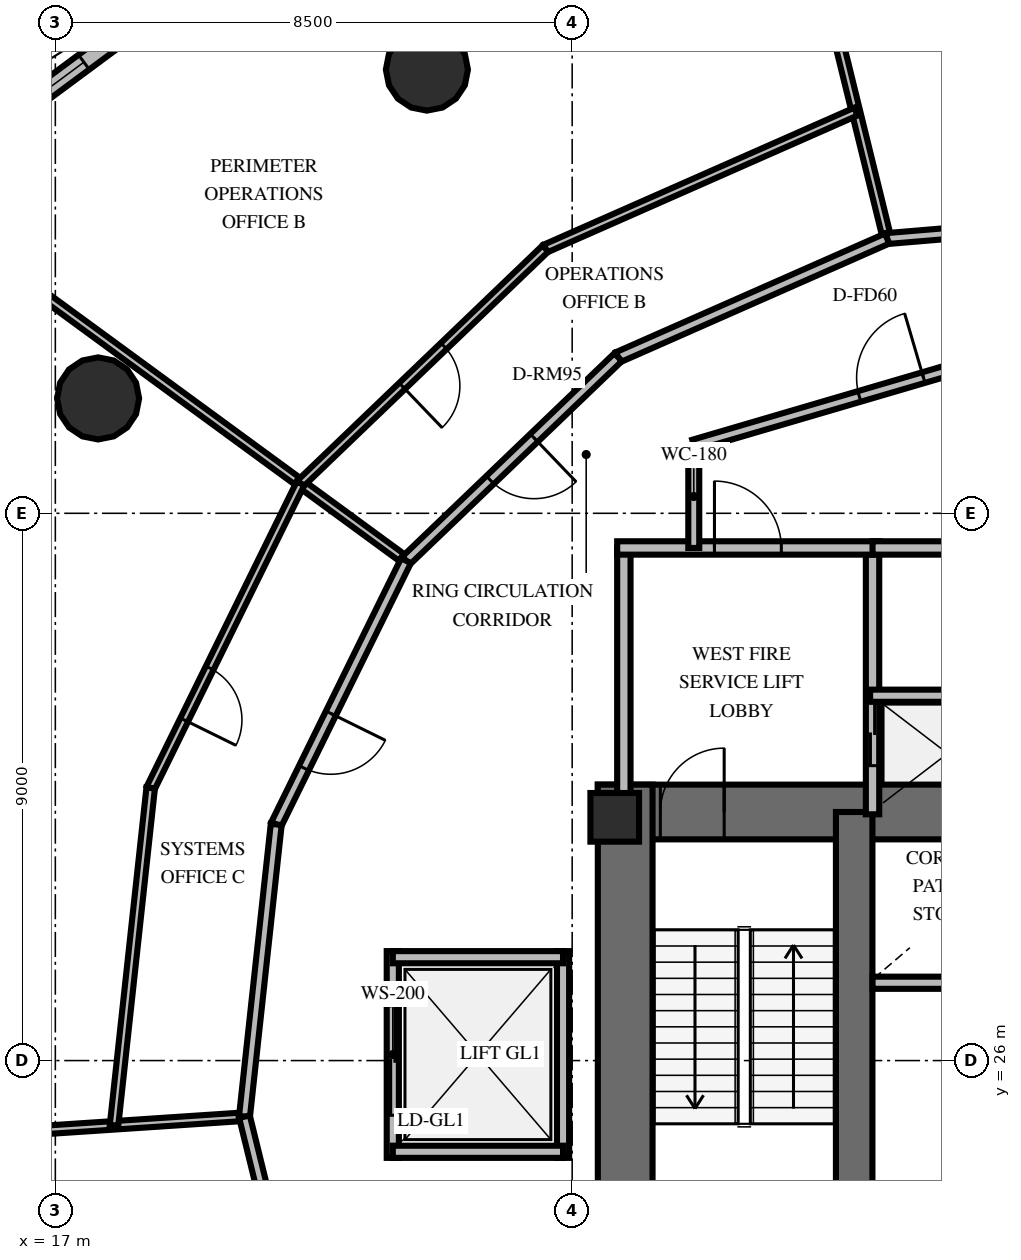
"""IFC4 building model, lengths in metres.
Left out: names, types, materials, properties, quantities, classifications, styles, units other than length and angle.
Written with IfcOpenShell. Run it as: python <this file> out.ifc"""

import sys

from ifc_helpers import new_model, si_unit, direction, frame, frame_2d, origin, origin_2d, place, context, subcontext, project, spatial, rectangle, circle, extrude, element, fill, save


model = new_model("IFC4")
c1 = context("Model", 3, precision=1e-05, world=origin(), true_north=direction((0.0, 1.0)))
c2 = subcontext(c1, "Body", "Model", "MODEL_VIEW")
j1 = project(units=[si_unit("LENGTHUNIT", "METRE"), si_unit("PLANEANGLEUNIT", "RADIAN")], contexts=[c1])
p1 = place(None, origin())
s1 = spatial("IfcSite", under=j1, at=p1, CompositionType="ELEMENT")
p2 = place(p1, origin())
s2 = spatial("IfcBuilding", under=s1, at=p2, CompositionType="ELEMENT")
p3 = place(p2, frame((0.0, 0.0, 46.8)))
s3 = spatial("IfcBuildingStorey", under=s2, at=p3, CompositionType="ELEMENT", Elevation=46.8)
p4 = place(p3, frame((25.922, 30.088, 0.0), z_axis=(0.0, 0.0, 1.0), x_axis=(1.0, 0.0, 0.0)))
e1 = element("IfcWall", 1, at=p4, inside=s3, PredefinedType="SHEAR", context=c2, shape_type="SweptSolid", body=[
    extrude(rectangle(XDim=16.166, YDim=0.9, at=frame_2d((8.083, 0.0))), origin(), (0.0, 0.0, 1.0), 4.2),
])
p5 = place(p4, frame((1.028, 0.0, 0.0)))
e2 = element("IfcOpeningElement", 2, at=p5, cuts=e1, PredefinedType="OPENING", context=c2, shape_type="SweptSolid", body=[
    extrude(rectangle(XDim=1.05, YDim=2.15, at=frame_2d((0.525, 1.075))), frame((0.0, 0.46, 0.0), z_axis=(0.0, -1.0, 0.0), x_axis=(1.0, 0.0, 0.0)), (0.0, 0.0, 1.0), 0.92),
])
p6 = place(p4, frame((14.078, 0.0, 0.0)))
e3 = element("IfcOpeningElement", 3, at=p6, cuts=e1, PredefinedType="OPENING", context=c2, shape_type="SweptSolid", body=[
    extrude(rectangle(XDim=1.05, YDim=2.15, at=frame_2d((0.525, 1.075))), frame((0.0, 0.46, 0.0), z_axis=(0.0, -1.0, 0.0), x_axis=(1.0, 0.0, 0.0)), (0.0, 0.0, 1.0), 0.92),
])
p7 = place(p4, frame((7.528, 0.0, 0.0)))
e4 = element("IfcOpeningElement", 4, at=p7, cuts=e1, PredefinedType="OPENING", context=c2, shape_type="SweptSolid", body=[
    extrude(rectangle(XDim=1.1, YDim=2.15, at=frame_2d((0.55, 1.075))), frame((0.0, 0.46, 0.0), z_axis=(0.0, -1.0, 0.0), x_axis=(1.0, 0.0, 0.0)), (0.0, 0.0, 1.0), 0.92),
])
p8 = place(p3, frame((26.372, 19.662, 0.0), z_axis=(0.0, 0.0, 1.0), x_axis=(0.0, 1.0, 0.0)))
e5 = element("IfcWall", 5, at=p8, inside=s3, PredefinedType="SHEAR", context=c2, shape_type="SweptSolid", body=[
    extrude(rectangle(XDim=10.876, YDim=0.9, at=frame_2d((5.438, 0.0))), origin(), (0.0, 0.0, 1.0), 4.2),
])
p9 = place(p3, frame((30.138, 20.112, 0.0), z_axis=(0.0, 0.0, 1.0), x_axis=(0.0, 1.0, 0.0)))
e6 = element("IfcWall", 6, at=p9, inside=s3, PredefinedType="SHEAR", context=c2, shape_type="SweptSolid", body=[
    extrude(rectangle(XDim=9.976, YDim=0.6, at=frame_2d((4.988, 0.0))), origin(), (0.0, 0.0, 1.0), 4.2),
])
p10 = place(p3, frame((26.2, 30.0, 0.0), z_axis=(0.0, 0.0, 1.0), x_axis=(1.0, 0.0, 0.0)))
e7 = element("IfcColumn", 7, at=p10, inside=s3, PredefinedType="PILASTER", context=c2, shape_type="SweptSolid", body=[
    extrude(rectangle(XDim=0.8, YDim=0.8, at=origin_2d()), origin(), (0.0, 0.0, 1.0), 4.2),
])
for number, where, z_axis, x_axis in (
    (8, (23.111, 42.297, 0.0), (0.0, 0.0, 1.0), (1.0, 0.0, 0.0)),
    (9, (17.703, 36.889, 0.0), (0.0, 0.0, 1.0), (1.0, 0.0, 0.0)),
):
    element("IfcColumn", number, at=place(p3, frame(where, z_axis=z_axis, x_axis=x_axis)), inside=s3, PredefinedType="COLUMN", context=c2, shape_type="SweptSolid", body=[
        extrude(circle(Radius=0.675, at=origin_2d()), origin(), (0.0, 0.0, 1.0), 4.2),
    ])
p11 = place(p3, frame((18.908, 43.485, 0.0), z_axis=(0.0, 0.0, 1.0), x_axis=(-0.803465201032, -0.595351720187, 0.0)))
e10 = element("IfcWall", 10, at=p11, inside=s3, PredefinedType="SOLIDWALL", context=c2, shape_type="SweptSolid", body=[
    extrude(rectangle(XDim=8.792, YDim=0.3, at=frame_2d((4.396, 0.0))), origin(), (0.0, 0.0, 1.0), 3.0),
])
p12 = place(p11, frame((1.79, 0.0, 0.8)))
e11 = element("IfcOpeningElement", 11, at=p12, cuts=e10, PredefinedType="OPENING", context=c2, shape_type="SweptSolid", body=[
    extrude(rectangle(XDim=1.8, YDim=1.95, at=frame_2d((0.9, 0.975))), frame((0.0, 0.16, 0.0), z_axis=(0.0, -1.0, 0.0), x_axis=(1.0, 0.0, 0.0)), (0.0, 0.0, 1.0), 0.32),
])
p13 = place(p3, frame((26.35, 30.05, 0.0), z_axis=(0.0, 0.0, 1.0), x_axis=(0.0, 1.0, 0.0)))
e12 = element("IfcWall", 12, at=p13, inside=s3, PredefinedType="SOLIDWALL", context=c2, shape_type="SweptSolid", body=[
    extrude(rectangle(XDim=4.38, YDim=0.22, at=frame_2d((2.19, 0.0))), origin(), (0.0, 0.0, 1.0), 3.0),
])
p14 = place(p3, frame((30.44, 30.05, 0.0), z_axis=(0.0, 0.0, 1.0), x_axis=(0.0, 1.0, 0.0)))
e13 = element("IfcWall", 13, at=p14, inside=s3, PredefinedType="SOLIDWALL", context=c2, shape_type="SweptSolid", body=[
    extrude(rectangle(XDim=4.38, YDim=0.22, at=frame_2d((2.19, 0.0))), origin(), (0.0, 0.0, 1.0), 3.0),
])
p15 = place(p14, frame((0.8, 0.0, 0.0)))
e14 = element("IfcOpeningElement", 14, at=p15, cuts=e13, PredefinedType="OPENING", context=c2, shape_type="SweptSolid", body=[
    extrude(rectangle(XDim=1.05, YDim=2.1, at=frame_2d((0.525, 1.05))), frame((0.0, 0.12, 0.0), z_axis=(0.0, -1.0, 0.0), x_axis=(1.0, 0.0, 0.0)), (0.0, 0.0, 1.0), 0.24),
])
p16 = place(p3, frame((26.24, 34.43, 0.0), z_axis=(0.0, 0.0, 1.0), x_axis=(1.0, 0.0, 0.0)))
e15 = element("IfcWall", 15, at=p16, inside=s3, PredefinedType="SOLIDWALL", context=c2, shape_type="SweptSolid", body=[
    extrude(rectangle(XDim=4.31, YDim=0.22, at=frame_2d((2.155, 0.0))), origin(), (0.0, 0.0, 1.0), 3.0),
])
p17 = place(p16, frame((1.6, 0.0, 0.0)))
e16 = element("IfcOpeningElement", 16, at=p17, cuts=e15, PredefinedType="OPENING", context=c2, shape_type="SweptSolid", body=[
    extrude(rectangle(XDim=1.1, YDim=2.15, at=frame_2d((0.55, 1.075))), frame((0.0, 0.12, 0.0), z_axis=(0.0, -1.0, 0.0), x_axis=(1.0, 0.0, 0.0)), (0.0, 0.0, 1.0), 0.24),
])
p18 = place(p3, frame((30.4, 32.0, 0.0), z_axis=(0.0, 0.0, 1.0), x_axis=(1.0, 0.0, 0.0)))
e17 = element("IfcWall", 17, at=p18, inside=s3, PredefinedType="SOLIDWALL", context=c2, shape_type="SweptSolid", body=[
    extrude(rectangle(XDim=2.55, YDim=0.2, at=frame_2d((1.275, 0.0))), origin(), (0.0, 0.0, 1.0), 3.0),
])
p19 = place(p3, frame((30.44, 34.43, 0.0), z_axis=(0.0, 0.0, 1.0), x_axis=(1.0, 0.0, 0.0)))
e18 = element("IfcWall", 18, at=p19, inside=s3, PredefinedType="SOLIDWALL", context=c2, shape_type="SweptSolid", body=[
    extrude(rectangle(XDim=7.12, YDim=0.22, at=frame_2d((3.56, 0.0))), origin(), (0.0, 0.0, 1.0), 3.0),
])
p20 = place(p19, frame((3.01, 0.0, 0.0)))
e19 = element("IfcOpeningElement", 19, at=p20, cuts=e18, PredefinedType="OPENING", context=c2, shape_type="SweptSolid", body=[
    extrude(rectangle(XDim=1.1, YDim=2.15, at=frame_2d((0.55, 1.075))), frame((0.0, 0.12, 0.0), z_axis=(0.0, -1.0, 0.0), x_axis=(1.0, 0.0, 0.0)), (0.0, 0.0, 1.0), 0.24),
])
p21 = place(p3, frame((30.44, 27.28, 0.0), z_axis=(0.0, 0.0, 1.0), x_axis=(1.0, 0.0, 0.0)))
e20 = element("IfcWall", 20, at=p21, inside=s3, PredefinedType="SOLIDWALL", context=c2, shape_type="SweptSolid", body=[
    extrude(rectangle(XDim=2.81, YDim=0.2, at=frame_2d((1.405, 0.0))), origin(), (0.0, 0.0, 1.0), 3.0),
])
p22 = place(p3, frame((22.55, 24.4, 0.0), z_axis=(0.0, 0.0, 1.0), x_axis=(0.0, 1.0, 0.0)))
e21 = element("IfcWall", 21, at=p22, inside=s3, PredefinedType="SOLIDWALL", context=c2, shape_type="SweptSolid", body=[
    extrude(rectangle(XDim=3.4, YDim=0.2, at=frame_2d((1.7, 0.0))), origin(), (0.0, 0.0, 1.0), 3.0),
])
p23 = place(p22, frame((0.7, 0.0, 0.0)))
e22 = element("IfcOpeningElement", 22, at=p23, cuts=e21, PredefinedType="OPENING", context=c2, shape_type="SweptSolid", body=[
    extrude(rectangle(XDim=1.8, YDim=2.4, at=frame_2d((0.9, 1.2))), frame((0.0, 0.11, 0.0), z_axis=(0.0, -1.0, 0.0), x_axis=(1.0, 0.0, 0.0)), (0.0, 0.0, 1.0), 0.22),
])
p24 = place(p3, frame((25.35, 24.4, 0.0), z_axis=(0.0, 0.0, 1.0), x_axis=(0.0, 1.0, 0.0)))
e23 = element("IfcWall", 23, at=p24, inside=s3, PredefinedType="SOLIDWALL", context=c2, shape_type="SweptSolid", body=[
    extrude(rectangle(XDim=3.4, YDim=0.2, at=frame_2d((1.7, 0.0))), origin(), (0.0, 0.0, 1.0), 3.0),
])
for number, where, z_axis, x_axis in (
    (24, (22.55, 24.5, 0.0), (0.0, 0.0, 1.0), (1.0, 0.0, 0.0)),
    (25, (22.55, 27.7, 0.0), (0.0, 0.0, 1.0), (1.0, 0.0, 0.0)),
):
    element("IfcWall", number, at=place(p3, frame(where, z_axis=z_axis, x_axis=x_axis)), inside=s3, PredefinedType="SOLIDWALL", context=c2, shape_type="SweptSolid", body=[
        extrude(rectangle(XDim=2.8, YDim=0.2, at=frame_2d((1.4, 0.0))), origin(), (0.0, 0.0, 1.0), 3.0),
    ])
p25 = place(p3, frame((27.5, 34.43, 0.0), z_axis=(0.0, 0.0, 1.0), x_axis=(0.0, 1.0, 0.0)))
e26 = element("IfcWall", 26, at=p25, inside=s3, PredefinedType="PARTITIONING", context=c2, shape_type="SweptSolid", body=[
    extrude(rectangle(XDim=1.693, YDim=0.18, at=frame_2d((0.846, 0.0))), origin(), (0.0, 0.0, 1.0), 3.0),
])
p26 = place(p3, frame((27.5, 36.123, 0.0), z_axis=(0.0, 0.0, 1.0), x_axis=(0.959546654541, 0.281549671923, 0.0)))
e27 = element("IfcWall", 27, at=p26, inside=s3, PredefinedType="PARTITIONING", context=c2, shape_type="SweptSolid", body=[
    extrude(rectangle(XDim=6.774, YDim=0.18, at=frame_2d((3.387, 0.0))), origin(), (0.0, 0.0, 1.0), 3.0),
])
p27 = place(p26, frame((2.837, 0.0, 0.0)))
e28 = element("IfcOpeningElement", 28, at=p27, cuts=e27, PredefinedType="OPENING", context=c2, shape_type="SweptSolid", body=[
    extrude(rectangle(XDim=1.1, YDim=2.15, at=frame_2d((0.55, 1.075))), frame((0.0, 0.1, 0.0), z_axis=(0.0, -1.0, 0.0), x_axis=(1.0, 0.0, 0.0)), (0.0, 0.0, 1.0), 0.2),
])
p28 = place(p3, frame((30.68, 39.518, 0.0), z_axis=(0.0, 0.0, 1.0), x_axis=(-0.238558066821, 0.971128234969, 0.0)))
e29 = element("IfcWall", 29, at=p28, inside=s3, PredefinedType="PARTITIONING", context=c2, shape_type="SweptSolid", body=[
    extrude(rectangle(XDim=7.514, YDim=0.14, at=frame_2d((3.757, 0.0))), origin(), (0.0, 0.0, 1.0), 3.0),
])
p29 = place(p3, frame((35.02, 39.883, 0.0), z_axis=(0.0, 0.0, 1.0), x_axis=(-0.99649609518, -0.083639298718, 0.0)))
e30 = element("IfcWall", 30, at=p29, inside=s3, PredefinedType="PARTITIONING", context=c2, shape_type="SweptSolid", body=[
    extrude(rectangle(XDim=4.355, YDim=0.18, at=frame_2d((2.178, 0.0))), origin(), (0.0, 0.0, 1.0), 3.0),
])
p30 = place(p29, frame((0.914, 0.0, 0.0)))
e31 = element("IfcOpeningElement", 31, at=p30, cuts=e30, PredefinedType="OPENING", context=c2, shape_type="SweptSolid", body=[
    extrude(rectangle(XDim=1.0, YDim=2.15, at=frame_2d((0.5, 1.075))), frame((0.0, 0.1, 0.0), z_axis=(0.0, -1.0, 0.0), x_axis=(1.0, 0.0, 0.0)), (0.0, 0.0, 1.0), 0.2),
])
p31 = place(p3, frame((22.767, 34.221, 0.0), z_axis=(0.0, 0.0, 1.0), x_axis=(-0.806954200192, 0.590614018453, 0.0)))
e32 = element("IfcWall", 32, at=p31, inside=s3, PredefinedType="PARTITIONING", context=c2, shape_type="SweptSolid", body=[
    extrude(rectangle(XDim=10.55, YDim=0.14, at=frame_2d((5.275, 0.0))), origin(), (0.0, 0.0, 1.0), 3.0),
])
p32 = place(p3, frame((30.68, 39.518, 0.0), z_axis=(0.0, 0.0, 1.0), x_axis=(-0.914959483899, -0.403545713425, 0.0)))
e33 = element("IfcWall", 33, at=p32, inside=s3, PredefinedType="PARTITIONING", context=c2, shape_type="SweptSolid", body=[
    extrude(rectangle(XDim=4.834, YDim=0.18, at=frame_2d((2.417, 0.0))), origin(), (0.0, 0.0, 1.0), 3.0),
])
p33 = place(p3, frame((26.256, 37.567, 0.0), z_axis=(0.0, 0.0, 1.0), x_axis=(-0.721748503055, -0.692155400425, 0.0)))
e34 = element("IfcWall", 34, at=p33, inside=s3, PredefinedType="PARTITIONING", context=c2, shape_type="SweptSolid", body=[
    extrude(rectangle(XDim=4.834, YDim=0.18, at=frame_2d((2.417, 0.0))), origin(), (0.0, 0.0, 1.0), 3.0),
])
p34 = place(p33, frame((1.917, 0.0, 0.0)))
e35 = element("IfcOpeningElement", 35, at=p34, cuts=e34, PredefinedType="OPENING", context=c2, shape_type="SweptSolid", body=[
    extrude(rectangle(XDim=1.0, YDim=2.15, at=frame_2d((0.5, 1.075))), frame((0.0, 0.1, 0.0), z_axis=(0.0, -1.0, 0.0), x_axis=(1.0, 0.0, 0.0)), (0.0, 0.0, 1.0), 0.2),
])
p35 = place(p3, frame((30.167, 41.606, 0.0), z_axis=(0.0, 0.0, 1.0), x_axis=(-0.914960559012, -0.403543275812, 0.0)))
e36 = element("IfcWall", 36, at=p35, inside=s3, PredefinedType="PARTITIONING", context=c2, shape_type="SweptSolid", body=[
    extrude(rectangle(XDim=5.581, YDim=0.14, at=frame_2d((2.791, 0.0))), origin(), (0.0, 0.0, 1.0), 3.0),
])
p36 = place(p3, frame((25.06, 39.354, 0.0), z_axis=(0.0, 0.0, 1.0), x_axis=(-0.721758722744, -0.692144743636, 0.0)))
e37 = element("IfcWall", 37, at=p36, inside=s3, PredefinedType="PARTITIONING", context=c2, shape_type="SweptSolid", body=[
    extrude(rectangle(XDim=5.581, YDim=0.14, at=frame_2d((2.791, 0.0))), origin(), (0.0, 0.0, 1.0), 3.0),
])
p37 = place(p36, frame((2.315, 0.0, 0.0)))
e38 = element("IfcOpeningElement", 38, at=p37, cuts=e37, PredefinedType="OPENING", context=c2, shape_type="SweptSolid", body=[
    extrude(rectangle(XDim=0.95, YDim=2.15, at=frame_2d((0.475, 1.075))), frame((0.0, 0.08, 0.0), z_axis=(0.0, -1.0, 0.0), x_axis=(1.0, 0.0, 0.0)), (0.0, 0.0, 1.0), 0.16),
])
p38 = place(p3, frame((20.111, 25.077, 0.0), z_axis=(0.0, 0.0, 1.0), x_axis=(-0.99780247965, -0.066258671923, 0.0)))
e39 = element("IfcWall", 39, at=p38, inside=s3, PredefinedType="PARTITIONING", context=c2, shape_type="SweptSolid", body=[
    extrude(rectangle(XDim=13.88, YDim=0.14, at=frame_2d((6.94, 0.0))), origin(), (0.0, 0.0, 1.0), 3.0),
])
p39 = place(p3, frame((22.767, 34.221, 0.0), z_axis=(0.0, 0.0, 1.0), x_axis=(-0.44148764498, -0.897267328799, 0.0)))
e40 = element("IfcWall", 40, at=p39, inside=s3, PredefinedType="PARTITIONING", context=c2, shape_type="SweptSolid", body=[
    extrude(rectangle(XDim=4.834, YDim=0.18, at=frame_2d((2.417, 0.0))), origin(), (0.0, 0.0, 1.0), 3.0),
])
p40 = place(p39, frame((2.801, 0.0, 0.0)))
e41 = element("IfcOpeningElement", 41, at=p40, cuts=e40, PredefinedType="OPENING", context=c2, shape_type="SweptSolid", body=[
    extrude(rectangle(XDim=1.0, YDim=2.15, at=frame_2d((0.5, 1.075))), frame((0.0, 0.1, 0.0), z_axis=(0.0, -1.0, 0.0), x_axis=(1.0, 0.0, 0.0)), (0.0, 0.0, 1.0), 0.2),
])
p41 = place(p3, frame((20.633, 29.884, 0.0), z_axis=(0.0, 0.0, 1.0), x_axis=(-0.108020120209, -0.994148708006, 0.0)))
e42 = element("IfcWall", 42, at=p41, inside=s3, PredefinedType="PARTITIONING", context=c2, shape_type="SweptSolid", body=[
    extrude(rectangle(XDim=4.834, YDim=0.18, at=frame_2d((2.417, 0.0))), origin(), (0.0, 0.0, 1.0), 3.0),
])
p42 = place(p3, frame((21.032, 35.491, 0.0), z_axis=(0.0, 0.0, 1.0), x_axis=(-0.441482494999, -0.897269862756, 0.0)))
e43 = element("IfcWall", 43, at=p42, inside=s3, PredefinedType="PARTITIONING", context=c2, shape_type="SweptSolid", body=[
    extrude(rectangle(XDim=5.581, YDim=0.14, at=frame_2d((2.791, 0.0))), origin(), (0.0, 0.0, 1.0), 3.0),
])
p43 = place(p42, frame((3.383, 0.0, 0.0)))
e44 = element("IfcOpeningElement", 44, at=p43, cuts=e43, PredefinedType="OPENING", context=c2, shape_type="SweptSolid", body=[
    extrude(rectangle(XDim=0.95, YDim=2.15, at=frame_2d((0.475, 1.075))), frame((0.0, 0.08, 0.0), z_axis=(0.0, -1.0, 0.0), x_axis=(1.0, 0.0, 0.0)), (0.0, 0.0, 1.0), 0.16),
])
p44 = place(p3, frame((18.568, 30.483, 0.0), z_axis=(0.0, 0.0, 1.0), x_axis=(-0.10800654761, -0.994150182655, 0.0)))
e45 = element("IfcWall", 45, at=p44, inside=s3, PredefinedType="PARTITIONING", context=c2, shape_type="SweptSolid", body=[
    extrude(rectangle(XDim=5.581, YDim=0.14, at=frame_2d((2.791, 0.0))), origin(), (0.0, 0.0, 1.0), 3.0),
])
p45 = place(p3, frame((20.111, 25.077, 0.0), z_axis=(0.0, 0.0, 1.0), x_axis=(0.23856484239, -0.971126570523, 0.0)))
e46 = element("IfcWall", 46, at=p45, inside=s3, PredefinedType="PARTITIONING", context=c2, shape_type="SweptSolid", body=[
    extrude(rectangle(XDim=4.834, YDim=0.18, at=frame_2d((2.417, 0.0))), origin(), (0.0, 0.0, 1.0), 3.0),
])
p46 = place(p45, frame((2.801, 0.0, 0.0)))
e47 = element("IfcOpeningElement", 47, at=p46, cuts=e46, PredefinedType="OPENING", context=c2, shape_type="SweptSolid", body=[
    extrude(rectangle(XDim=1.0, YDim=2.15, at=frame_2d((0.5, 1.075))), frame((0.0, 0.1, 0.0), z_axis=(0.0, -1.0, 0.0), x_axis=(1.0, 0.0, 0.0)), (0.0, 0.0, 1.0), 0.2),
])
p47 = place(p12, origin())
e48 = element("IfcWindow", 48, at=p47, inside=s3, PartitioningType="SINGLE_PANEL", PredefinedType="WINDOW", context=c2, shape_type="SweptSolid", body=[
    extrude(rectangle(XDim=1.8, YDim=1.95, at=frame_2d((0.9, 0.975))), frame((0.0, 0.03, 0.0), z_axis=(0.0, -1.0, 0.0), x_axis=(1.0, 0.0, 0.0)), (0.0, 0.0, 1.0), 0.06),
])
fill(e11, e48)
p48 = place(p5, origin())
e49 = element("IfcDoor", 49, at=p48, inside=s3, OperationType="SINGLE_SWING_RIGHT", PredefinedType="DOOR", context=c2, shape_type="SweptSolid", body=[
    extrude(rectangle(XDim=1.05, YDim=2.15, at=frame_2d((0.525, 1.075))), frame((0.0, 0.025, 0.0), z_axis=(0.0, -1.0, 0.0), x_axis=(1.0, 0.0, 0.0)), (0.0, 0.0, 1.0), 0.05),
])
fill(e2, e49)
p49 = place(p17, origin())
e50 = element("IfcDoor", 50, at=p49, inside=s3, OperationType="SINGLE_SWING_LEFT", PredefinedType="DOOR", context=c2, shape_type="SweptSolid", body=[
    extrude(rectangle(XDim=1.1, YDim=2.15, at=frame_2d((0.55, 1.075))), frame((0.0, 0.025, 0.0), z_axis=(0.0, -1.0, 0.0), x_axis=(1.0, 0.0, 0.0)), (0.0, 0.0, 1.0), 0.05),
])
fill(e16, e50)
p50 = place(p15, origin())
e51 = element("IfcDoor", 51, at=p50, inside=s3, OperationType="DOUBLE_DOOR_SLIDING", PredefinedType="USERDEFINED", context=c2, shape_type="SweptSolid", body=[
    extrude(rectangle(XDim=1.05, YDim=2.1, at=frame_2d((0.525, 1.05))), frame((0.0, 0.025, 0.0), z_axis=(0.0, -1.0, 0.0), x_axis=(1.0, 0.0, 0.0)), (0.0, 0.0, 1.0), 0.05),
])
fill(e14, e51)
p51 = place(p23, origin())
e52 = element("IfcDoor", 52, at=p51, inside=s3, OperationType="DOUBLE_DOOR_SLIDING", PredefinedType="USERDEFINED", context=c2, shape_type="SweptSolid", body=[
    extrude(rectangle(XDim=1.8, YDim=2.4, at=frame_2d((0.9, 1.2))), frame((0.0, 0.025, 0.0), z_axis=(0.0, -1.0, 0.0), x_axis=(1.0, 0.0, 0.0)), (0.0, 0.0, 1.0), 0.05),
])
fill(e22, e52)
p52 = place(p27, origin())
e53 = element("IfcDoor", 53, at=p52, inside=s3, OperationType="SINGLE_SWING_RIGHT", PredefinedType="DOOR", context=c2, shape_type="SweptSolid", body=[
    extrude(rectangle(XDim=1.1, YDim=2.15, at=frame_2d((0.55, 1.075))), frame((0.0, 0.025, 0.0), z_axis=(0.0, -1.0, 0.0), x_axis=(1.0, 0.0, 0.0)), (0.0, 0.0, 1.0), 0.05),
])
fill(e28, e53)
p53 = place(p34, origin())
e54 = element("IfcDoor", 54, at=p53, inside=s3, OperationType="SINGLE_SWING_LEFT", PredefinedType="DOOR", context=c2, shape_type="SweptSolid", body=[
    extrude(rectangle(XDim=1.0, YDim=2.15, at=frame_2d((0.5, 1.075))), frame((0.0, 0.025, 0.0), z_axis=(0.0, -1.0, 0.0), x_axis=(1.0, 0.0, 0.0)), (0.0, 0.0, 1.0), 0.05),
])
fill(e35, e54)
p54 = place(p37, origin())
e55 = element("IfcDoor", 55, at=p54, inside=s3, OperationType="SINGLE_SWING_RIGHT", PredefinedType="DOOR", context=c2, shape_type="SweptSolid", body=[
    extrude(rectangle(XDim=0.95, YDim=2.15, at=frame_2d((0.475, 1.075))), frame((0.0, 0.025, 0.0), z_axis=(0.0, -1.0, 0.0), x_axis=(1.0, 0.0, 0.0)), (0.0, 0.0, 1.0), 0.05),
])
fill(e38, e55)
p55 = place(p40, origin())
e56 = element("IfcDoor", 56, at=p55, inside=s3, OperationType="SINGLE_SWING_LEFT", PredefinedType="DOOR", context=c2, shape_type="SweptSolid", body=[
    extrude(rectangle(XDim=1.0, YDim=2.15, at=frame_2d((0.5, 1.075))), frame((0.0, 0.025, 0.0), z_axis=(0.0, -1.0, 0.0), x_axis=(1.0, 0.0, 0.0)), (0.0, 0.0, 1.0), 0.05),
])
fill(e41, e56)
p56 = place(p43, origin())
e57 = element("IfcDoor", 57, at=p56, inside=s3, OperationType="SINGLE_SWING_RIGHT", PredefinedType="DOOR", context=c2, shape_type="SweptSolid", body=[
    extrude(rectangle(XDim=0.95, YDim=2.15, at=frame_2d((0.475, 1.075))), frame((0.0, 0.025, 0.0), z_axis=(0.0, -1.0, 0.0), x_axis=(1.0, 0.0, 0.0)), (0.0, 0.0, 1.0), 0.05),
])
fill(e44, e57)
save(model, sys.argv[1])
